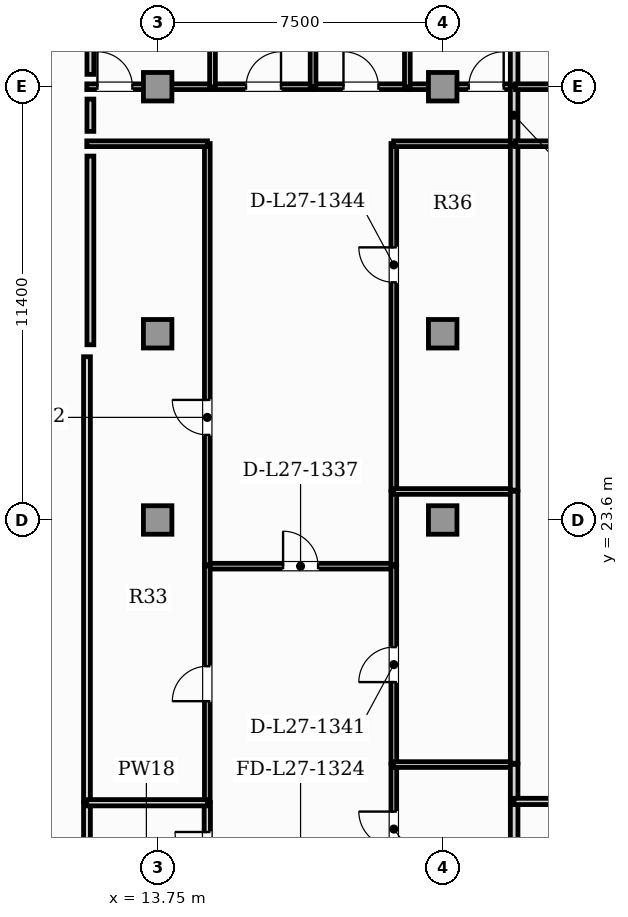
"""IFC4 building model, lengths in metres.
Left out: names, types, materials, properties, quantities, classifications, styles, units other than length and angle.
Written with IfcOpenShell. Run it as: python <this file> out.ifc"""

import sys

from ifc_helpers import new_model, si_unit, direction, frame, frame_2d, origin, origin_2d, place, context, subcontext, project, spatial, rectangle, extrude, element, fill, save


model = new_model("IFC4")
c1 = context("Model", 3, precision=1e-05, world=origin(), true_north=direction((0.0, 1.0)))
c2 = subcontext(c1, "Body", "Model", "MODEL_VIEW")
j1 = project(units=[si_unit("LENGTHUNIT", "METRE"), si_unit("PLANEANGLEUNIT", "RADIAN")], contexts=[c1])
p1 = place(None, origin())
s1 = spatial("IfcSite", under=j1, at=p1, CompositionType="ELEMENT")
p2 = place(p1, origin())
s2 = spatial("IfcBuilding", under=s1, at=p2, CompositionType="ELEMENT")
p3 = place(p2, frame((0.0, 0.0, 111.85)))
s3 = spatial("IfcBuildingStorey", under=s2, at=p3, CompositionType="ELEMENT", Elevation=111.85)
for number, where, z_axis, x_axis in (
    (1, (13.75, 23.6, 0.0), (0.0, 0.0, 1.0), (1.0, 0.0, 0.0)),
    (2, (21.25, 23.6, 0.0), (0.0, 0.0, 1.0), (1.0, 0.0, 0.0)),
    (3, (13.75, 28.5, 0.0), (0.0, 0.0, 1.0), (1.0, 0.0, 0.0)),
    (4, (21.25, 28.5, 0.0), (0.0, 0.0, 1.0), (1.0, 0.0, 0.0)),
    (5, (13.75, 35.0, 0.0), (0.0, 0.0, 1.0), (1.0, 0.0, 0.0)),
    (6, (21.25, 35.0, 0.0), (0.0, 0.0, 1.0), (1.0, 0.0, 0.0)),
):
    element("IfcColumn", number, at=place(p3, frame(where, z_axis=z_axis, x_axis=x_axis)), inside=s3, PredefinedType="COLUMN", context=c2, shape_type="SweptSolid", body=[
        extrude(rectangle(XDim=0.75, YDim=0.75, at=origin_2d()), origin(), (0.0, 0.0, 1.0), 3.85),
    ])
p4 = place(p3, frame((11.89, 13.765, 0.0), z_axis=(0.0, 0.0, 1.0), x_axis=(0.0, 1.0, 0.0)))
e7 = element("IfcWall", 7, at=p4, inside=s3, PredefinedType="PARTITIONING", context=c2, shape_type="SweptSolid", body=[
    extrude(rectangle(XDim=2.4, YDim=0.18, at=frame_2d((1.2, 0.0))), origin(), (0.0, 0.0, 1.0), 3.6),
])
p5 = place(p3, frame((11.89, 16.195, 0.0), z_axis=(0.0, 0.0, 1.0), x_axis=(0.0, 1.0, 0.0)))
e8 = element("IfcWall", 8, at=p5, inside=s3, PredefinedType="PARTITIONING", context=c2, shape_type="SweptSolid", body=[
    extrude(rectangle(XDim=11.7, YDim=0.18, at=frame_2d((5.85, 0.0))), origin(), (0.0, 0.0, 1.0), 3.6),
])
p6 = place(p3, frame((15.051, 22.385, 0.0), z_axis=(0.0, 0.0, 1.0), x_axis=(1.0, 0.0, 0.0)))
e9 = element("IfcWall", 9, at=p6, inside=s3, PredefinedType="PARTITIONING", context=c2, shape_type="SweptSolid", body=[
    extrude(rectangle(XDim=4.917, YDim=0.15, at=frame_2d((2.459, 0.0))), origin(), (0.0, 0.0, 1.0), 3.6),
])
p7 = place(p6, frame((1.999, 0.0, 0.0)))
e10 = element("IfcOpeningElement", 10, at=p7, cuts=e9, PredefinedType="OPENING", context=c2, shape_type="SweptSolid", body=[
    extrude(rectangle(XDim=0.92, YDim=2.1, at=frame_2d((0.46, 1.05))), frame((0.0, 0.085, 0.0), z_axis=(0.0, -1.0, 0.0), x_axis=(1.0, 0.0, 0.0)), (0.0, 0.0, 1.0), 0.17),
])
p8 = place(p3, frame((15.056, 13.765, 0.0), z_axis=(0.0, 0.0, 1.0), x_axis=(0.0, 1.0, 0.0)))
e11 = element("IfcWall", 11, at=p8, inside=s3, PredefinedType="PLUMBINGWALL", context=c2, shape_type="SweptSolid", body=[
    extrude(rectangle(XDim=2.4, YDim=0.165, at=frame_2d((1.2, 0.0))), origin(), (0.0, 0.0, 1.0), 3.6),
])
p9 = place(p8, frame((0.775, 0.0, 0.0)))
e12 = element("IfcOpeningElement", 12, at=p9, cuts=e11, PredefinedType="OPENING", context=c2, shape_type="SweptSolid", body=[
    extrude(rectangle(XDim=0.85, YDim=2.1, at=frame_2d((0.425, 1.05))), frame((0.0, 0.093, 0.0), z_axis=(0.0, -1.0, 0.0), x_axis=(1.0, 0.0, 0.0)), (0.0, 0.0, 1.0), 0.185),
])
p10 = place(p3, frame((15.056, 16.195, 0.0), z_axis=(0.0, 0.0, 1.0), x_axis=(0.0, 1.0, 0.0)))
e13 = element("IfcWall", 13, at=p10, inside=s3, PredefinedType="PARTITIONING", context=c2, shape_type="SweptSolid", body=[
    extrude(rectangle(XDim=6.194, YDim=0.15, at=frame_2d((3.097, 0.0))), origin(), (0.0, 0.0, 1.0), 3.6),
])
p11 = place(p10, frame((2.637, 0.0, 0.0)))
e14 = element("IfcOpeningElement", 14, at=p11, cuts=e13, PredefinedType="OPENING", context=c2, shape_type="SweptSolid", body=[
    extrude(rectangle(XDim=0.92, YDim=2.1, at=frame_2d((0.46, 1.05))), frame((0.0, 0.085, 0.0), z_axis=(0.0, -1.0, 0.0), x_axis=(1.0, 0.0, 0.0)), (0.0, 0.0, 1.0), 0.17),
])
p12 = place(p3, frame((19.964, 13.765, 0.0), z_axis=(0.0, 0.0, 1.0), x_axis=(0.0, 1.0, 0.0)))
e15 = element("IfcWall", 15, at=p12, inside=s3, PredefinedType="PARTITIONING", context=c2, shape_type="SweptSolid", body=[
    extrude(rectangle(XDim=3.405, YDim=0.15, at=frame_2d((1.703, 0.0))), origin(), (0.0, 0.0, 1.0), 3.6),
])
p13 = place(p12, frame((1.242, 0.0, 0.0)))
e16 = element("IfcOpeningElement", 16, at=p13, cuts=e15, PredefinedType="OPENING", context=c2, shape_type="SweptSolid", body=[
    extrude(rectangle(XDim=0.92, YDim=2.1, at=frame_2d((0.46, 1.05))), frame((0.0, 0.085, 0.0), z_axis=(0.0, -1.0, 0.0), x_axis=(1.0, 0.0, 0.0)), (0.0, 0.0, 1.0), 0.17),
])
p14 = place(p3, frame((19.964, 17.2, 0.0), z_axis=(0.0, 0.0, 1.0), x_axis=(0.0, 1.0, 0.0)))
e17 = element("IfcWall", 17, at=p14, inside=s3, PredefinedType="PARTITIONING", context=c2, shape_type="SweptSolid", body=[
    extrude(rectangle(XDim=5.19, YDim=0.15, at=frame_2d((2.595, 0.0))), origin(), (0.0, 0.0, 1.0), 3.6),
])
p15 = place(p14, frame((2.135, 0.0, 0.0)))
e18 = element("IfcOpeningElement", 18, at=p15, cuts=e17, PredefinedType="OPENING", context=c2, shape_type="SweptSolid", body=[
    extrude(rectangle(XDim=0.92, YDim=2.1, at=frame_2d((0.46, 1.05))), frame((0.0, 0.085, 0.0), z_axis=(0.0, -1.0, 0.0), x_axis=(1.0, 0.0, 0.0)), (0.0, 0.0, 1.0), 0.17),
])
p16 = place(p3, frame((15.056, 22.419, 0.0), z_axis=(0.0, 0.0, 1.0), x_axis=(0.0, 1.0, 0.0)))
e19 = element("IfcWall", 19, at=p16, inside=s3, PredefinedType="PARTITIONING", context=c2, shape_type="SweptSolid", body=[
    extrude(rectangle(XDim=11.085, YDim=0.15, at=frame_2d((5.543, 0.0))), origin(), (0.0, 0.0, 1.0), 3.6),
])
p17 = place(p16, frame((3.42, 0.0, 0.0)))
e20 = element("IfcOpeningElement", 20, at=p17, cuts=e19, PredefinedType="OPENING", context=c2, shape_type="SweptSolid", body=[
    extrude(rectangle(XDim=0.92, YDim=2.1, at=frame_2d((0.46, 1.05))), frame((0.0, 0.085, 0.0), z_axis=(0.0, -1.0, 0.0), x_axis=(1.0, 0.0, 0.0)), (0.0, 0.0, 1.0), 0.17),
])
p18 = place(p3, frame((11.885, 33.5, 0.0), z_axis=(0.0, 0.0, 1.0), x_axis=(1.0, 0.0, 0.0)))
e21 = element("IfcWall", 21, at=p18, inside=s3, PredefinedType="PARTITIONING", context=c2, shape_type="SweptSolid", body=[
    extrude(rectangle(XDim=3.176, YDim=0.15, at=frame_2d((1.588, 0.0))), origin(), (0.0, 0.0, 1.0), 3.6),
])
p19 = place(p3, frame((19.964, 22.419, 0.0), z_axis=(0.0, 0.0, 1.0), x_axis=(0.0, 1.0, 0.0)))
e22 = element("IfcWall", 22, at=p19, inside=s3, PredefinedType="PARTITIONING", context=c2, shape_type="SweptSolid", body=[
    extrude(rectangle(XDim=1.936, YDim=0.15, at=frame_2d((0.968, 0.0))), origin(), (0.0, 0.0, 1.0), 3.6),
])
p20 = place(p3, frame((19.964, 24.385, 0.0), z_axis=(0.0, 0.0, 1.0), x_axis=(0.0, 1.0, 0.0)))
e23 = element("IfcWall", 23, at=p20, inside=s3, PredefinedType="PARTITIONING", context=c2, shape_type="SweptSolid", body=[
    extrude(rectangle(XDim=9.12, YDim=0.15, at=frame_2d((4.56, 0.0))), origin(), (0.0, 0.0, 1.0), 3.6),
])
p21 = place(p20, frame((5.468, 0.0, 0.0)))
e24 = element("IfcOpeningElement", 24, at=p21, cuts=e23, PredefinedType="OPENING", context=c2, shape_type="SweptSolid", body=[
    extrude(rectangle(XDim=0.92, YDim=2.1, at=frame_2d((0.46, 1.05))), frame((0.0, 0.085, 0.0), z_axis=(0.0, -1.0, 0.0), x_axis=(1.0, 0.0, 0.0)), (0.0, 0.0, 1.0), 0.17),
])
p22 = place(p3, frame((19.959, 33.5, 0.0), z_axis=(0.0, 0.0, 1.0), x_axis=(1.0, 0.0, 0.0)))
e25 = element("IfcWall", 25, at=p22, inside=s3, PredefinedType="PARTITIONING", context=c2, shape_type="SweptSolid", body=[
    extrude(rectangle(XDim=3.176, YDim=0.15, at=frame_2d((1.588, 0.0))), origin(), (0.0, 0.0, 1.0), 3.6),
])
p23 = place(p3, frame((11.885, 35.0, 0.0), z_axis=(0.0, 0.0, 1.0), x_axis=(1.0, 0.0, 0.0)))
e26 = element("IfcWall", 26, at=p23, inside=s3, PredefinedType="PARTITIONING", context=c2, shape_type="SweptSolid", body=[
    extrude(rectangle(XDim=3.313, YDim=0.15, at=frame_2d((1.656, 0.0))), origin(), (0.0, 0.0, 1.0), 2.983),
])
p24 = place(p23, frame((0.28, 0.0, 0.0)))
e27 = element("IfcOpeningElement", 27, at=p24, cuts=e26, PredefinedType="OPENING", context=c2, shape_type="SweptSolid", body=[
    extrude(rectangle(XDim=0.92, YDim=2.1, at=frame_2d((0.46, 1.05))), frame((0.0, 0.085, 0.0), z_axis=(0.0, -1.0, 0.0), x_axis=(1.0, 0.0, 0.0)), (0.0, 0.0, 1.0), 0.17),
])
p25 = place(p3, frame((15.228, 35.0, 0.0), z_axis=(0.0, 0.0, 1.0), x_axis=(1.0, 0.0, 0.0)))
e28 = element("IfcWall", 28, at=p25, inside=s3, PredefinedType="PARTITIONING", context=c2, shape_type="SweptSolid", body=[
    extrude(rectangle(XDim=2.616, YDim=0.15, at=frame_2d((1.308, 0.0))), origin(), (0.0, 0.0, 1.0), 2.983),
])
p26 = place(p25, frame((0.848, 0.0, 0.0)))
e29 = element("IfcOpeningElement", 29, at=p26, cuts=e28, PredefinedType="OPENING", context=c2, shape_type="SweptSolid", body=[
    extrude(rectangle(XDim=0.92, YDim=2.1, at=frame_2d((0.46, 1.05))), frame((0.0, 0.085, 0.0), z_axis=(0.0, -1.0, 0.0), x_axis=(1.0, 0.0, 0.0)), (0.0, 0.0, 1.0), 0.17),
])
p27 = place(p3, frame((17.874, 35.0, 0.0), z_axis=(0.0, 0.0, 1.0), x_axis=(1.0, 0.0, 0.0)))
e30 = element("IfcWall", 30, at=p27, inside=s3, PredefinedType="PARTITIONING", context=c2, shape_type="SweptSolid", body=[
    extrude(rectangle(XDim=2.451, YDim=0.15, at=frame_2d((1.226, 0.0))), origin(), (0.0, 0.0, 1.0), 2.983),
])
p28 = place(p27, frame((0.766, 0.0, 0.0)))
e31 = element("IfcOpeningElement", 31, at=p28, cuts=e30, PredefinedType="OPENING", context=c2, shape_type="SweptSolid", body=[
    extrude(rectangle(XDim=0.92, YDim=2.1, at=frame_2d((0.46, 1.05))), frame((0.0, 0.085, 0.0), z_axis=(0.0, -1.0, 0.0), x_axis=(1.0, 0.0, 0.0)), (0.0, 0.0, 1.0), 0.17),
])
p29 = place(p3, frame((20.355, 35.0, 0.0), z_axis=(0.0, 0.0, 1.0), x_axis=(1.0, 0.0, 0.0)))
e32 = element("IfcWall", 32, at=p29, inside=s3, PredefinedType="PARTITIONING", context=c2, shape_type="SweptSolid", body=[
    extrude(rectangle(XDim=2.78, YDim=0.15, at=frame_2d((1.39, 0.0))), origin(), (0.0, 0.0, 1.0), 2.983),
])
p30 = place(p29, frame((1.58, 0.0, 0.0)))
e33 = element("IfcOpeningElement", 33, at=p30, cuts=e32, PredefinedType="OPENING", context=c2, shape_type="SweptSolid", body=[
    extrude(rectangle(XDim=0.92, YDim=2.1, at=frame_2d((0.46, 1.05))), frame((0.0, 0.085, 0.0), z_axis=(0.0, -1.0, 0.0), x_axis=(1.0, 0.0, 0.0)), (0.0, 0.0, 1.0), 0.17),
])
p31 = place(p3, frame((23.13, 33.495, 0.0), z_axis=(0.0, 0.0, 1.0), x_axis=(0.0, 1.0, 0.0)))
e34 = element("IfcWall", 34, at=p31, inside=s3, PredefinedType="PARTITIONING", context=c2, shape_type="SweptSolid", body=[
    extrude(rectangle(XDim=1.51, YDim=0.2, at=frame_2d((0.755, 0.0))), origin(), (0.0, 0.0, 1.0), 3.6),
])
p32 = place(p3, frame((11.885, 16.16, 0.0), z_axis=(0.0, 0.0, 1.0), x_axis=(1.0, 0.0, 0.0)))
e35 = element("IfcWall", 35, at=p32, inside=s3, PredefinedType="PLUMBINGWALL", context=c2, shape_type="SweptSolid", body=[
    extrude(rectangle(XDim=3.176, YDim=0.165, at=frame_2d((1.588, 0.0))), origin(), (0.0, 0.0, 1.0), 3.6),
])
p33 = place(p3, frame((19.959, 17.165, 0.0), z_axis=(0.0, 0.0, 1.0), x_axis=(1.0, 0.0, 0.0)))
e36 = element("IfcWall", 36, at=p33, inside=s3, PredefinedType="PARTITIONING", context=c2, shape_type="SweptSolid", body=[
    extrude(rectangle(XDim=3.176, YDim=0.15, at=frame_2d((1.588, 0.0))), origin(), (0.0, 0.0, 1.0), 3.6),
])
p34 = place(p3, frame((23.13, 13.765, 0.0), z_axis=(0.0, 0.0, 1.0), x_axis=(0.0, 1.0, 0.0)))
e37 = element("IfcWall", 37, at=p34, inside=s3, PredefinedType="PARTITIONING", context=c2, shape_type="SweptSolid", body=[
    extrude(rectangle(XDim=2.435, YDim=0.2, at=frame_2d((1.217, 0.0))), origin(), (0.0, 0.0, 1.0), 3.6),
])
p35 = place(p3, frame((23.13, 16.23, 0.0), z_axis=(0.0, 0.0, 1.0), x_axis=(0.0, 1.0, 0.0)))
e38 = element("IfcWall", 38, at=p35, inside=s3, PredefinedType="PARTITIONING", context=c2, shape_type="SweptSolid", body=[
    extrude(rectangle(XDim=0.94, YDim=0.2, at=frame_2d((0.47, 0.0))), origin(), (0.0, 0.0, 1.0), 3.6),
])
p36 = place(p3, frame((19.959, 24.35, 0.0), z_axis=(0.0, 0.0, 1.0), x_axis=(1.0, 0.0, 0.0)))
e39 = element("IfcWall", 39, at=p36, inside=s3, PredefinedType="PARTITIONING", context=c2, shape_type="SweptSolid", body=[
    extrude(rectangle(XDim=3.176, YDim=0.15, at=frame_2d((1.588, 0.0))), origin(), (0.0, 0.0, 1.0), 3.6),
])
p37 = place(p3, frame((23.13, 17.2, 0.0), z_axis=(0.0, 0.0, 1.0), x_axis=(0.0, 1.0, 0.0)))
e40 = element("IfcWall", 40, at=p37, inside=s3, PredefinedType="PARTITIONING", context=c2, shape_type="SweptSolid", body=[
    extrude(rectangle(XDim=7.155, YDim=0.2, at=frame_2d((3.578, 0.0))), origin(), (0.0, 0.0, 1.0), 3.6),
])
p38 = place(p3, frame((23.13, 24.385, 0.0), z_axis=(0.0, 0.0, 1.0), x_axis=(0.0, 1.0, 0.0)))
e41 = element("IfcWall", 41, at=p38, inside=s3, PredefinedType="PARTITIONING", context=c2, shape_type="SweptSolid", body=[
    extrude(rectangle(XDim=9.08, YDim=0.2, at=frame_2d((4.54, 0.0))), origin(), (0.0, 0.0, 1.0), 3.6),
])
p39 = place(p3, frame((15.193, 34.995, 0.0), z_axis=(0.0, 0.0, 1.0), x_axis=(0.0, 1.0, 0.0)))
e42 = element("IfcWall", 42, at=p39, inside=s3, PredefinedType="PARTITIONING", context=c2, shape_type="SweptSolid", body=[
    extrude(rectangle(XDim=7.995, YDim=0.15, at=frame_2d((3.998, 0.0))), origin(), (0.0, 0.0, 1.0), 3.6),
])
p40 = place(p3, frame((17.839, 34.995, 0.0), z_axis=(0.0, 0.0, 1.0), x_axis=(0.0, 1.0, 0.0)))
e43 = element("IfcWall", 43, at=p40, inside=s3, PredefinedType="PARTITIONING", context=c2, shape_type="SweptSolid", body=[
    extrude(rectangle(XDim=7.907, YDim=0.15, at=frame_2d((3.954, 0.0))), origin(), (0.0, 0.0, 1.0), 3.6),
])
p41 = place(p3, frame((20.32, 34.995, 0.0), z_axis=(0.0, 0.0, 1.0), x_axis=(0.0, 1.0, 0.0)))
e44 = element("IfcWall", 44, at=p41, inside=s3, PredefinedType="PARTITIONING", context=c2, shape_type="SweptSolid", body=[
    extrude(rectangle(XDim=7.995, YDim=0.15, at=frame_2d((3.998, 0.0))), origin(), (0.0, 0.0, 1.0), 3.6),
])
p42 = place(p3, frame((23.13, 35.035, 0.0), z_axis=(0.0, 0.0, 1.0), x_axis=(0.0, 1.0, 0.0)))
e45 = element("IfcWall", 45, at=p42, inside=s3, PredefinedType="PARTITIONING", context=c2, shape_type="SweptSolid", body=[
    extrude(rectangle(XDim=7.955, YDim=0.2, at=frame_2d((3.978, 0.0))), origin(), (0.0, 0.0, 1.0), 3.6),
])
p43 = place(p3, frame((23.165, 33.5, 0.0), z_axis=(0.0, 0.0, 1.0), x_axis=(1.0, 0.0, 0.0)))
e46 = element("IfcWall", 46, at=p43, inside=s3, PredefinedType="PARTITIONING", context=c2, shape_type="SweptSolid", body=[
    extrude(rectangle(XDim=3.09, YDim=0.15, at=frame_2d((1.545, 0.0))), origin(), (0.0, 0.0, 1.0), 3.6),
])
p44 = place(p3, frame((23.165, 35.0, 0.0), z_axis=(0.0, 0.0, 1.0), x_axis=(1.0, 0.0, 0.0)))
e47 = element("IfcWall", 47, at=p44, inside=s3, PredefinedType="PARTITIONING", context=c2, shape_type="SweptSolid", body=[
    extrude(rectangle(XDim=3.273, YDim=0.15, at=frame_2d((1.636, 0.0))), origin(), (0.0, 0.0, 1.0), 2.983),
])
p45 = place(p44, frame((1.177, 0.0, 0.0)))
e48 = element("IfcOpeningElement", 48, at=p45, cuts=e47, PredefinedType="OPENING", context=c2, shape_type="SweptSolid", body=[
    extrude(rectangle(XDim=0.92, YDim=2.1, at=frame_2d((0.46, 1.05))), frame((0.0, 0.085, 0.0), z_axis=(0.0, -1.0, 0.0), x_axis=(1.0, 0.0, 0.0)), (0.0, 0.0, 1.0), 0.17),
])
p46 = place(p3, frame((23.125, 16.195, 0.0), z_axis=(0.0, 0.0, 1.0), x_axis=(1.0, 0.0, 0.0)))
e49 = element("IfcWall", 49, at=p46, inside=s3, PredefinedType="PLUMBINGWALL", context=c2, shape_type="SweptSolid", body=[
    extrude(rectangle(XDim=3.13, YDim=0.165, at=frame_2d((1.565, 0.0))), origin(), (0.0, 0.0, 1.0), 3.6),
])
p47 = place(p3, frame((11.98, 33.825, 0.0), z_axis=(0.0, 0.0, 1.0), x_axis=(0.0, 1.0, 0.0)))
e50 = element("IfcWall", 50, at=p47, inside=s3, PredefinedType="PARTITIONING", context=c2, shape_type="SweptSolid", body=[
    extrude(rectangle(XDim=0.85, YDim=0.18, at=frame_2d((0.425, 0.0))), origin(), (0.0, 0.0, 1.0), 3.6),
])
p48 = place(p3, frame((11.98, 28.21, 0.0), z_axis=(0.0, 0.0, 1.0), x_axis=(0.0, 1.0, 0.0)))
e51 = element("IfcWall", 51, at=p48, inside=s3, PredefinedType="PARTITIONING", context=c2, shape_type="SweptSolid", body=[
    extrude(rectangle(XDim=4.965, YDim=0.18, at=frame_2d((2.482, 0.0))), origin(), (0.0, 0.0, 1.0), 3.6),
])
p49 = place(p3, frame((11.98, 35.325, 0.0), z_axis=(0.0, 0.0, 1.0), x_axis=(0.0, 1.0, 0.0)))
e52 = element("IfcWall", 52, at=p49, inside=s3, PredefinedType="PARTITIONING", context=c2, shape_type="SweptSolid", body=[
    extrude(rectangle(XDim=7.665, YDim=0.18, at=frame_2d((3.833, 0.0))), origin(), (0.0, 0.0, 1.0), 3.6),
])
p50 = place(p7, origin())
e53 = element("IfcDoor", 53, at=p50, inside=s3, OperationType="SINGLE_SWING_LEFT", PredefinedType="DOOR", context=c2, shape_type="SweptSolid", body=[
    extrude(rectangle(XDim=0.92, YDim=2.1, at=frame_2d((0.46, 1.05))), frame((0.0, 0.025, 0.0), z_axis=(0.0, -1.0, 0.0), x_axis=(1.0, 0.0, 0.0)), (0.0, 0.0, 1.0), 0.05),
])
fill(e10, e53)
p51 = place(p9, origin())
e54 = element("IfcDoor", 54, at=p51, inside=s3, OperationType="SINGLE_SWING_RIGHT", PredefinedType="DOOR", context=c2, shape_type="SweptSolid", body=[
    extrude(rectangle(XDim=0.85, YDim=2.1, at=frame_2d((0.425, 1.05))), frame((0.0, 0.025, 0.0), z_axis=(0.0, -1.0, 0.0), x_axis=(1.0, 0.0, 0.0)), (0.0, 0.0, 1.0), 0.05),
])
fill(e12, e54)
p52 = place(p11, origin())
e55 = element("IfcDoor", 55, at=p52, inside=s3, OperationType="SINGLE_SWING_LEFT", PredefinedType="DOOR", context=c2, shape_type="SweptSolid", body=[
    extrude(rectangle(XDim=0.92, YDim=2.1, at=frame_2d((0.46, 1.05))), frame((0.0, 0.025, 0.0), z_axis=(0.0, -1.0, 0.0), x_axis=(1.0, 0.0, 0.0)), (0.0, 0.0, 1.0), 0.05),
])
fill(e14, e55)
p53 = place(p13, origin())
e56 = element("IfcDoor", 56, at=p53, inside=s3, OperationType="SINGLE_SWING_RIGHT", PredefinedType="DOOR", context=c2, shape_type="SweptSolid", body=[
    extrude(rectangle(XDim=0.92, YDim=2.1, at=frame_2d((0.46, 1.05))), frame((0.0, 0.025, 0.0), z_axis=(0.0, -1.0, 0.0), x_axis=(1.0, 0.0, 0.0)), (0.0, 0.0, 1.0), 0.05),
])
fill(e16, e56)
p54 = place(p15, origin())
e57 = element("IfcDoor", 57, at=p54, inside=s3, OperationType="SINGLE_SWING_LEFT", PredefinedType="DOOR", context=c2, shape_type="SweptSolid", body=[
    extrude(rectangle(XDim=0.92, YDim=2.1, at=frame_2d((0.46, 1.05))), frame((0.0, 0.025, 0.0), z_axis=(0.0, -1.0, 0.0), x_axis=(1.0, 0.0, 0.0)), (0.0, 0.0, 1.0), 0.05),
])
fill(e18, e57)
p55 = place(p17, origin())
e58 = element("IfcDoor", 58, at=p55, inside=s3, OperationType="SINGLE_SWING_RIGHT", PredefinedType="DOOR", context=c2, shape_type="SweptSolid", body=[
    extrude(rectangle(XDim=0.92, YDim=2.1, at=frame_2d((0.46, 1.05))), frame((0.0, 0.025, 0.0), z_axis=(0.0, -1.0, 0.0), x_axis=(1.0, 0.0, 0.0)), (0.0, 0.0, 1.0), 0.05),
])
fill(e20, e58)
p56 = place(p21, origin())
e59 = element("IfcDoor", 59, at=p56, inside=s3, OperationType="SINGLE_SWING_RIGHT", PredefinedType="DOOR", context=c2, shape_type="SweptSolid", body=[
    extrude(rectangle(XDim=0.92, YDim=2.1, at=frame_2d((0.46, 1.05))), frame((0.0, 0.025, 0.0), z_axis=(0.0, -1.0, 0.0), x_axis=(1.0, 0.0, 0.0)), (0.0, 0.0, 1.0), 0.05),
])
fill(e24, e59)
p57 = place(p24, origin())
e60 = element("IfcDoor", 60, at=p57, inside=s3, OperationType="SINGLE_SWING_LEFT", PredefinedType="DOOR", context=c2, shape_type="SweptSolid", body=[
    extrude(rectangle(XDim=0.92, YDim=2.1, at=frame_2d((0.46, 1.05))), frame((0.0, 0.025, 0.0), z_axis=(0.0, -1.0, 0.0), x_axis=(1.0, 0.0, 0.0)), (0.0, 0.0, 1.0), 0.05),
])
fill(e27, e60)
p58 = place(p26, origin())
e61 = element("IfcDoor", 61, at=p58, inside=s3, OperationType="SINGLE_SWING_RIGHT", PredefinedType="DOOR", context=c2, shape_type="SweptSolid", body=[
    extrude(rectangle(XDim=0.92, YDim=2.1, at=frame_2d((0.46, 1.05))), frame((0.0, 0.025, 0.0), z_axis=(0.0, -1.0, 0.0), x_axis=(1.0, 0.0, 0.0)), (0.0, 0.0, 1.0), 0.05),
])
fill(e29, e61)
p59 = place(p28, origin())
e62 = element("IfcDoor", 62, at=p59, inside=s3, OperationType="SINGLE_SWING_LEFT", PredefinedType="DOOR", context=c2, shape_type="SweptSolid", body=[
    extrude(rectangle(XDim=0.92, YDim=2.1, at=frame_2d((0.46, 1.05))), frame((0.0, 0.025, 0.0), z_axis=(0.0, -1.0, 0.0), x_axis=(1.0, 0.0, 0.0)), (0.0, 0.0, 1.0), 0.05),
])
fill(e31, e62)
p60 = place(p30, origin())
e63 = element("IfcDoor", 63, at=p60, inside=s3, OperationType="SINGLE_SWING_RIGHT", PredefinedType="DOOR", context=c2, shape_type="SweptSolid", body=[
    extrude(rectangle(XDim=0.92, YDim=2.1, at=frame_2d((0.46, 1.05))), frame((0.0, 0.025, 0.0), z_axis=(0.0, -1.0, 0.0), x_axis=(1.0, 0.0, 0.0)), (0.0, 0.0, 1.0), 0.05),
])
fill(e33, e63)
save(model, sys.argv[1])
